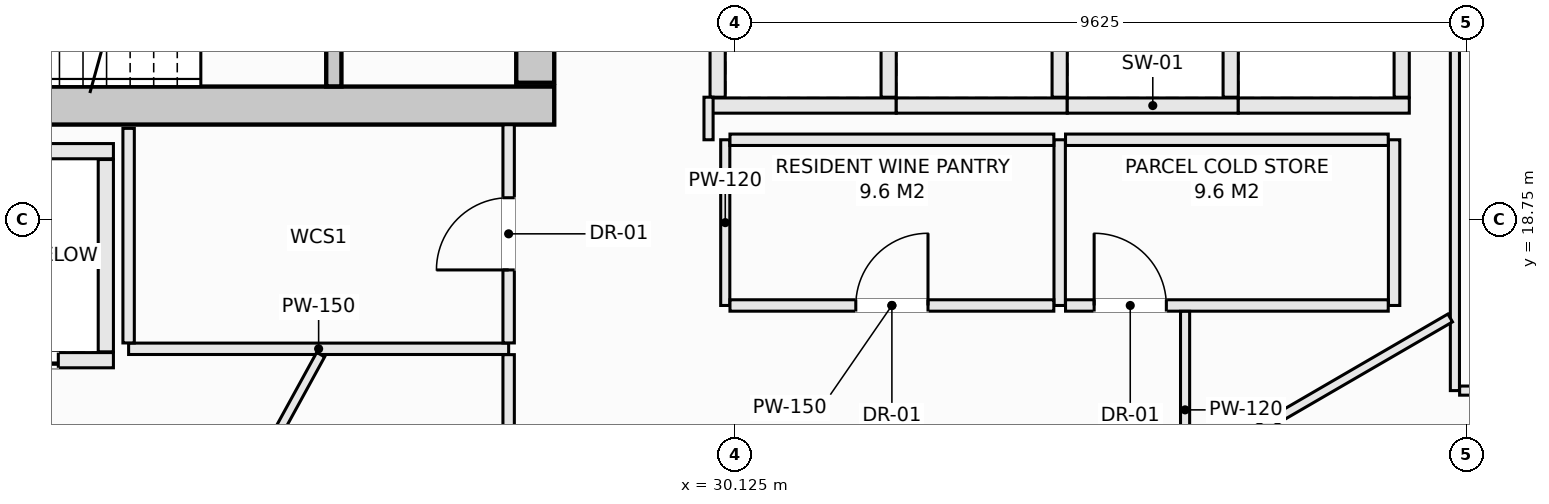
"""IFC4 building model, lengths in metres.
Left out: names, types, materials, properties, quantities, classifications, styles, units other than length and angle.
Written with IfcOpenShell. Run it as: python <this file> out.ifc"""

import sys

from ifc_helpers import new_model, si_unit, direction, frame, frame_2d, origin, place, context, subcontext, project, spatial, rectangle, extrude, element, fill, save


model = new_model("IFC4")
c1 = context("Model", 3, precision=1e-05, world=origin(), true_north=direction((0.0, 1.0)))
c2 = subcontext(c1, "Body", "Model", "MODEL_VIEW")
j1 = project(units=[si_unit("LENGTHUNIT", "METRE"), si_unit("PLANEANGLEUNIT", "RADIAN")], contexts=[c1])
p1 = place(None, origin())
s1 = spatial("IfcSite", under=j1, at=p1, CompositionType="ELEMENT")
p2 = place(p1, origin())
s2 = spatial("IfcBuilding", under=s1, at=p2, CompositionType="ELEMENT")
p3 = place(p2, frame((0.0, 0.0, 199.7)))
s3 = spatial("IfcBuildingStorey", under=s2, at=p3, CompositionType="ELEMENT", Elevation=199.7)
p4 = place(p3, frame((14.25, 20.25, -0.27), z_axis=(0.0, 0.0, 1.0), x_axis=(1.0, 0.0, 0.0)))
e1 = element("IfcWall", 1, at=p4, inside=s3, PredefinedType="SHEAR", context=c2, shape_type="SweptSolid", body=[
    extrude(rectangle(XDim=13.5, YDim=0.5, at=frame_2d((6.75, 0.0))), origin(), (0.0, 0.0, 1.0), 3.3),
])
p5 = place(p3, frame((27.5, 20.55, -0.27), z_axis=(0.0, 0.0, 1.0), x_axis=(0.0, 1.0, 0.0)))
e2 = element("IfcWall", 2, at=p5, inside=s3, PredefinedType="SHEAR", context=c2, shape_type="SweptSolid", body=[
    extrude(rectangle(XDim=1.5, YDim=0.5, at=frame_2d((0.75, 0.0))), origin(), (0.0, 0.0, 1.0), 3.3),
])
p6 = place(p3, frame((24.85, 20.502, -0.27), z_axis=(0.0, 0.0, 1.0), x_axis=(0.0, 1.0, 0.0)))
e3 = element("IfcWall", 3, at=p6, inside=s3, PredefinedType="SHEAR", context=c2, shape_type="SweptSolid", body=[
    extrude(rectangle(XDim=3.038, YDim=0.2, at=frame_2d((1.519, 0.0))), origin(), (0.0, 0.0, 1.0), 3.3),
])
p7 = place(p6, frame((0.969, 0.0, 0.27)))
e4 = element("IfcOpeningElement", 4, at=p7, cuts=e3, PredefinedType="OPENING", context=c2, shape_type="SweptSolid", body=[
    extrude(rectangle(XDim=1.1, YDim=2.15, at=frame_2d((0.55, 1.075))), frame((0.0, 0.11, 0.0), z_axis=(0.0, -1.0, 0.0), x_axis=(1.0, 0.0, 0.0)), (0.0, 0.0, 1.0), 0.22),
])
p8 = place(p3, frame((19.4, 19.65, 0.0), z_axis=(0.0, 0.0, 1.0), x_axis=(1.0, 0.0, 0.0)))
e5 = element("IfcWall", 5, at=p8, inside=s3, PredefinedType="SOLIDWALL", context=c2, shape_type="SweptSolid", body=[
    extrude(rectangle(XDim=2.55, YDim=0.2, at=frame_2d((1.275, 0.0))), origin(), (0.0, 0.0, 1.0), 3.03),
])
p9 = place(p3, frame((19.4, 16.9, 0.0), z_axis=(0.0, 0.0, 1.0), x_axis=(1.0, 0.0, 0.0)))
e6 = element("IfcWall", 6, at=p9, inside=s3, PredefinedType="SOLIDWALL", context=c2, shape_type="SweptSolid", body=[
    extrude(rectangle(XDim=2.55, YDim=0.2, at=frame_2d((1.275, 0.0))), origin(), (0.0, 0.0, 1.0), 3.03),
])
p10 = place(p9, frame((0.725, 0.0, 0.0)))
e7 = element("IfcOpeningElement", 7, at=p10, cuts=e6, PredefinedType="OPENING", context=c2, shape_type="SweptSolid", body=[
    extrude(rectangle(XDim=1.1, YDim=2.2, at=frame_2d((0.55, 1.1))), frame((0.0, 0.11, 0.0), z_axis=(0.0, -1.0, 0.0), x_axis=(1.0, 0.0, 0.0)), (0.0, 0.0, 1.0), 0.22),
])
p11 = place(p3, frame((21.85, 17.01, 0.0), z_axis=(0.0, 0.0, 1.0), x_axis=(0.0, 1.0, 0.0)))
e8 = element("IfcWall", 8, at=p11, inside=s3, PredefinedType="SOLIDWALL", context=c2, shape_type="SweptSolid", body=[
    extrude(rectangle(XDim=2.53, YDim=0.2, at=frame_2d((1.265, 0.0))), origin(), (0.0, 0.0, 1.0), 3.03),
])
p12 = place(p3, frame((29.8, 20.25, 0.0), z_axis=(0.0, 0.0, 1.0), x_axis=(1.0, 0.0, 0.0)))
e9 = element("IfcWall", 9, at=p12, inside=s3, PredefinedType="SOLIDWALL", context=c2, shape_type="SweptSolid", body=[
    extrude(rectangle(XDim=2.45, YDim=0.2, at=frame_2d((1.225, 0.0))), origin(), (0.0, 0.0, 1.0), 3.03),
])
for number, where, z_axis, x_axis in (
    (10, (29.9, 20.36, 0.0), (0.0, 0.0, 1.0), (0.0, 1.0, 0.0)),
    (11, (32.15, 20.36, 0.0), (0.0, 0.0, 1.0), (0.0, 1.0, 0.0)),
):
    element("IfcWall", number, at=place(p3, frame(where, z_axis=z_axis, x_axis=x_axis)), inside=s3, PredefinedType="SOLIDWALL", context=c2, shape_type="SweptSolid", body=[
        extrude(rectangle(XDim=2.43, YDim=0.2, at=frame_2d((1.215, 0.0))), origin(), (0.0, 0.0, 1.0), 3.03),
    ])
p13 = place(p3, frame((32.25, 20.25, 0.0), z_axis=(0.0, 0.0, 1.0), x_axis=(1.0, 0.0, 0.0)))
e12 = element("IfcWall", 12, at=p13, inside=s3, PredefinedType="SOLIDWALL", context=c2, shape_type="SweptSolid", body=[
    extrude(rectangle(XDim=2.25, YDim=0.2, at=frame_2d((1.125, 0.0))), origin(), (0.0, 0.0, 1.0), 3.03),
])
p14 = place(p3, frame((34.4, 20.36, 0.0), z_axis=(0.0, 0.0, 1.0), x_axis=(0.0, 1.0, 0.0)))
e13 = element("IfcWall", 13, at=p14, inside=s3, PredefinedType="SOLIDWALL", context=c2, shape_type="SweptSolid", body=[
    extrude(rectangle(XDim=2.43, YDim=0.2, at=frame_2d((1.215, 0.0))), origin(), (0.0, 0.0, 1.0), 3.03),
])
p15 = place(p3, frame((34.5, 20.25, 0.0), z_axis=(0.0, 0.0, 1.0), x_axis=(1.0, 0.0, 0.0)))
e14 = element("IfcWall", 14, at=p15, inside=s3, PredefinedType="SOLIDWALL", context=c2, shape_type="SweptSolid", body=[
    extrude(rectangle(XDim=2.25, YDim=0.2, at=frame_2d((1.125, 0.0))), origin(), (0.0, 0.0, 1.0), 3.03),
])
p16 = place(p3, frame((36.65, 20.36, 0.0), z_axis=(0.0, 0.0, 1.0), x_axis=(0.0, 1.0, 0.0)))
e15 = element("IfcWall", 15, at=p16, inside=s3, PredefinedType="SOLIDWALL", context=c2, shape_type="SweptSolid", body=[
    extrude(rectangle(XDim=2.43, YDim=0.2, at=frame_2d((1.215, 0.0))), origin(), (0.0, 0.0, 1.0), 3.03),
])
p17 = place(p3, frame((36.75, 20.25, 0.0), z_axis=(0.0, 0.0, 1.0), x_axis=(1.0, 0.0, 0.0)))
e16 = element("IfcWall", 16, at=p17, inside=s3, PredefinedType="SOLIDWALL", context=c2, shape_type="SweptSolid", body=[
    extrude(rectangle(XDim=2.25, YDim=0.2, at=frame_2d((1.125, 0.0))), origin(), (0.0, 0.0, 1.0), 3.03),
])
p18 = place(p3, frame((38.9, 20.36, 0.0), z_axis=(0.0, 0.0, 1.0), x_axis=(0.0, 1.0, 0.0)))
e17 = element("IfcWall", 17, at=p18, inside=s3, PredefinedType="SOLIDWALL", context=c2, shape_type="SweptSolid", body=[
    extrude(rectangle(XDim=2.43, YDim=0.2, at=frame_2d((1.215, 0.0))), origin(), (0.0, 0.0, 1.0), 3.03),
])
p19 = place(p3, frame((22.15, 17.05, 0.0), z_axis=(0.0, 0.0, 1.0), x_axis=(1.0, 0.0, 0.0)))
e18 = element("IfcWall", 18, at=p19, inside=s3, PredefinedType="PARTITIONING", context=c2, shape_type="SweptSolid", body=[
    extrude(rectangle(XDim=5.0, YDim=0.15, at=frame_2d((2.5, 0.0))), origin(), (0.0, 0.0, 1.0), 3.03),
])
p20 = place(p3, frame((22.15, 17.127, 0.0), z_axis=(0.0, 0.0, 1.0), x_axis=(0.0, 1.0, 0.0)))
e19 = element("IfcWall", 19, at=p20, inside=s3, PredefinedType="PARTITIONING", context=c2, shape_type="SweptSolid", body=[
    extrude(rectangle(XDim=2.823, YDim=0.15, at=frame_2d((1.412, 0.0))), origin(), (0.0, 0.0, 1.0), 3.03),
])
p21 = place(p3, frame((27.15, 11.113, 0.0), z_axis=(0.0, 0.0, 1.0), x_axis=(0.0, 1.0, 0.0)))
e20 = element("IfcWall", 20, at=p21, inside=s3, PredefinedType="PARTITIONING", context=c2, shape_type="SweptSolid", body=[
    extrude(rectangle(XDim=5.86, YDim=0.15, at=frame_2d((2.93, 0.0))), origin(), (0.0, 0.0, 1.0), 3.03),
])
p22 = place(p21, frame((2.158, 0.0, 0.0)))
e21 = element("IfcOpeningElement", 21, at=p22, cuts=e20, PredefinedType="OPENING", context=c2, shape_type="SweptSolid", body=[
    extrude(rectangle(XDim=0.95, YDim=2.1, at=frame_2d((0.475, 1.05))), frame((0.0, 0.085, 0.0), z_axis=(0.0, -1.0, 0.0), x_axis=(1.0, 0.0, 0.0)), (0.0, 0.0, 1.0), 0.17),
])
p23 = place(p3, frame((27.15, 17.127, 0.0), z_axis=(0.0, 0.0, 1.0), x_axis=(0.0, 1.0, 0.0)))
e22 = element("IfcWall", 22, at=p23, inside=s3, PredefinedType="PARTITIONING", context=c2, shape_type="SweptSolid", body=[
    extrude(rectangle(XDim=2.871, YDim=0.15, at=frame_2d((1.436, 0.0))), origin(), (0.0, 0.0, 1.0), 3.03),
])
p24 = place(p23, frame((0.96, 0.0, 0.0)))
e23 = element("IfcOpeningElement", 23, at=p24, cuts=e22, PredefinedType="OPENING", context=c2, shape_type="SweptSolid", body=[
    extrude(rectangle(XDim=0.95, YDim=2.1, at=frame_2d((0.475, 1.05))), frame((0.0, 0.085, 0.0), z_axis=(0.0, -1.0, 0.0), x_axis=(1.0, 0.0, 0.0)), (0.0, 0.0, 1.0), 0.17),
])
p25 = place(p3, frame((30.0, 17.62, 0.0), z_axis=(0.0, 0.0, 1.0), x_axis=(0.0, 1.0, 0.0)))
e24 = element("IfcWall", 24, at=p25, inside=s3, PredefinedType="PARTITIONING", context=c2, shape_type="SweptSolid", body=[
    extrude(rectangle(XDim=2.18, YDim=0.12, at=frame_2d((1.09, 0.0))), origin(), (0.0, 0.0, 1.0), 3.03),
])
for number, where, z_axis, x_axis in (
    (25, (38.8, 17.62, 0.0), (0.0, 0.0, 1.0), (0.0, 1.0, 0.0)),
    (26, (34.4, 17.62, 0.0), (0.0, 0.0, 1.0), (0.0, 1.0, 0.0)),
):
    element("IfcWall", number, at=place(p3, frame(where, z_axis=z_axis, x_axis=x_axis)), inside=s3, PredefinedType="PARTITIONING", context=c2, shape_type="SweptSolid", body=[
        extrude(rectangle(XDim=2.18, YDim=0.15, at=frame_2d((1.09, 0.0))), origin(), (0.0, 0.0, 1.0), 3.03),
    ])
p26 = place(p3, frame((30.062, 17.62, 0.0), z_axis=(0.0, 0.0, 1.0), x_axis=(1.0, 0.0, 0.0)))
e27 = element("IfcWall", 27, at=p26, inside=s3, PredefinedType="PARTITIONING", context=c2, shape_type="SweptSolid", body=[
    extrude(rectangle(XDim=4.261, YDim=0.15, at=frame_2d((2.13, 0.0))), origin(), (0.0, 0.0, 1.0), 3.03),
])
p27 = place(p26, frame((1.656, 0.0, 0.0)))
e28 = element("IfcOpeningElement", 28, at=p27, cuts=e27, PredefinedType="OPENING", context=c2, shape_type="SweptSolid", body=[
    extrude(rectangle(XDim=0.95, YDim=2.1, at=frame_2d((0.475, 1.05))), frame((0.0, 0.085, 0.0), z_axis=(0.0, -1.0, 0.0), x_axis=(1.0, 0.0, 0.0)), (0.0, 0.0, 1.0), 0.17),
])
p28 = place(p3, frame((34.477, 17.62, 0.0), z_axis=(0.0, 0.0, 1.0), x_axis=(1.0, 0.0, 0.0)))
e29 = element("IfcWall", 29, at=p28, inside=s3, PredefinedType="PARTITIONING", context=c2, shape_type="SweptSolid", body=[
    extrude(rectangle(XDim=4.246, YDim=0.15, at=frame_2d((2.123, 0.0))), origin(), (0.0, 0.0, 1.0), 3.03),
])
p29 = place(p28, frame((0.376, 0.0, 0.0)))
e30 = element("IfcOpeningElement", 30, at=p29, cuts=e29, PredefinedType="OPENING", context=c2, shape_type="SweptSolid", body=[
    extrude(rectangle(XDim=0.95, YDim=2.1, at=frame_2d((0.475, 1.05))), frame((0.0, 0.085, 0.0), z_axis=(0.0, -1.0, 0.0), x_axis=(1.0, 0.0, 0.0)), (0.0, 0.0, 1.0), 0.17),
])
p30 = place(p3, frame((30.062, 19.8, 0.0), z_axis=(0.0, 0.0, 1.0), x_axis=(1.0, 0.0, 0.0)))
e31 = element("IfcWall", 31, at=p30, inside=s3, PredefinedType="PARTITIONING", context=c2, shape_type="SweptSolid", body=[
    extrude(rectangle(XDim=4.261, YDim=0.15, at=frame_2d((2.13, 0.0))), origin(), (0.0, 0.0, 1.0), 3.03),
])
p31 = place(p3, frame((34.477, 19.8, 0.0), z_axis=(0.0, 0.0, 1.0), x_axis=(1.0, 0.0, 0.0)))
e32 = element("IfcWall", 32, at=p31, inside=s3, PredefinedType="PARTITIONING", context=c2, shape_type="SweptSolid", body=[
    extrude(rectangle(XDim=4.246, YDim=0.15, at=frame_2d((2.123, 0.0))), origin(), (0.0, 0.0, 1.0), 3.03),
])
p32 = place(p3, frame((39.6, 16.5, 0.0), z_axis=(0.0, 0.0, 1.0), x_axis=(0.0, 1.0, 0.0)))
e33 = element("IfcWall", 33, at=p32, inside=s3, PredefinedType="PARTITIONING", context=c2, shape_type="SweptSolid", body=[
    extrude(rectangle(XDim=6.52, YDim=0.12, at=frame_2d((3.26, 0.0))), origin(), (0.0, 0.0, 1.0), 2.478),
])
p33 = place(p3, frame((39.662, 16.5, 0.0), z_axis=(0.0, 0.0, 1.0), x_axis=(1.0, 0.0, 0.0)))
e34 = element("IfcWall", 34, at=p33, inside=s3, PredefinedType="PARTITIONING", context=c2, shape_type="SweptSolid", body=[
    extrude(rectangle(XDim=3.495, YDim=0.12, at=frame_2d((1.748, 0.0))), origin(), (0.0, 0.0, 1.0), 2.712),
])
p34 = place(p33, frame((1.272, 0.0, 0.0)))
e35 = element("IfcOpeningElement", 35, at=p34, cuts=e34, PredefinedType="OPENING", context=c2, shape_type="SweptSolid", body=[
    extrude(rectangle(XDim=0.95, YDim=2.1, at=frame_2d((0.475, 1.05))), frame((0.0, 0.07, 0.0), z_axis=(0.0, -1.0, 0.0), x_axis=(1.0, 0.0, 0.0)), (0.0, 0.0, 1.0), 0.14),
])
p35 = place(p3, frame((29.78, 19.8, 0.0), z_axis=(0.0, 0.0, 1.0), x_axis=(0.0, 1.0, 0.0)))
e36 = element("IfcWall", 36, at=p35, inside=s3, PredefinedType="PARTITIONING", context=c2, shape_type="SweptSolid", body=[
    extrude(rectangle(XDim=0.56, YDim=0.12, at=frame_2d((0.28, 0.0))), origin(), (0.0, 0.0, 1.0), 3.03),
])
p36 = place(p3, frame((36.05, 14.95, 0.0), z_axis=(0.0, 0.0, 1.0), x_axis=(0.0, 1.0, 0.0)))
e37 = element("IfcWall", 37, at=p36, inside=s3, PredefinedType="PARTITIONING", context=c2, shape_type="SweptSolid", body=[
    extrude(rectangle(XDim=2.593, YDim=0.12, at=frame_2d((1.296, 0.0))), origin(), (0.0, 0.0, 1.0), 3.03),
])
p37 = place(p3, frame((36.112, 15.466, 0.0), z_axis=(0.0, 0.0, 1.0), x_axis=(0.864713842027, 0.502264841898, 0.0)))
e38 = element("IfcWall", 38, at=p37, inside=s3, PredefinedType="PARTITIONING", context=c2, shape_type="SweptSolid", body=[
    extrude(rectangle(XDim=3.962, YDim=0.12, at=frame_2d((1.981, 0.0))), origin(), (0.0, 0.0, 1.0), 2.478),
])
p38 = place(p3, frame((39.576, 11.607, 0.0), z_axis=(0.0, 0.0, 1.0), x_axis=(0.597735703185, 0.801693226326, 0.0)))
e39 = element("IfcWall", 39, at=p38, inside=s3, PredefinedType="PARTITIONING", context=c2, shape_type="SweptSolid", body=[
    extrude(rectangle(XDim=6.062, YDim=0.15, at=frame_2d((3.031, 0.0))), origin(), (0.0, 0.0, 1.0), 3.03),
])
p39 = place(p3, frame((22.712, 13.392, 0.0), z_axis=(0.0, 0.0, 1.0), x_axis=(0.480957116097, 0.876744120297, 0.0)))
e40 = element("IfcWall", 40, at=p39, inside=s3, PredefinedType="PARTITIONING", context=c2, shape_type="SweptSolid", body=[
    extrude(rectangle(XDim=4.085, YDim=0.12, at=frame_2d((2.042, 0.0))), origin(), (0.0, 0.0, 1.0), 3.03),
])
p40 = place(p10, origin())
e41 = element("IfcDoor", 41, at=p40, inside=s3, OperationType="SLIDING_TO_LEFT", PredefinedType="DOOR", context=c2, shape_type="SweptSolid", body=[
    extrude(rectangle(XDim=1.1, YDim=2.2, at=frame_2d((0.55, 1.1))), frame((0.0, 0.025, 0.0), z_axis=(0.0, -1.0, 0.0), x_axis=(1.0, 0.0, 0.0)), (0.0, 0.0, 1.0), 0.05),
])
fill(e7, e41)
p41 = place(p24, origin())
e42 = element("IfcDoor", 42, at=p41, inside=s3, OperationType="SINGLE_SWING_LEFT", PredefinedType="DOOR", context=c2, shape_type="SweptSolid", body=[
    extrude(rectangle(XDim=0.95, YDim=2.1, at=frame_2d((0.475, 1.05))), frame((0.0, 0.025, 0.0), z_axis=(0.0, -1.0, 0.0), x_axis=(1.0, 0.0, 0.0)), (0.0, 0.0, 1.0), 0.05),
])
fill(e23, e42)
p42 = place(p27, origin())
e43 = element("IfcDoor", 43, at=p42, inside=s3, OperationType="SINGLE_SWING_RIGHT", PredefinedType="DOOR", context=c2, shape_type="SweptSolid", body=[
    extrude(rectangle(XDim=0.95, YDim=2.1, at=frame_2d((0.475, 1.05))), frame((0.0, 0.025, 0.0), z_axis=(0.0, -1.0, 0.0), x_axis=(1.0, 0.0, 0.0)), (0.0, 0.0, 1.0), 0.05),
])
fill(e28, e43)
p43 = place(p29, origin())
e44 = element("IfcDoor", 44, at=p43, inside=s3, OperationType="SINGLE_SWING_LEFT", PredefinedType="DOOR", context=c2, shape_type="SweptSolid", body=[
    extrude(rectangle(XDim=0.95, YDim=2.1, at=frame_2d((0.475, 1.05))), frame((0.0, 0.025, 0.0), z_axis=(0.0, -1.0, 0.0), x_axis=(1.0, 0.0, 0.0)), (0.0, 0.0, 1.0), 0.05),
])
fill(e30, e44)
save(model, sys.argv[1])
